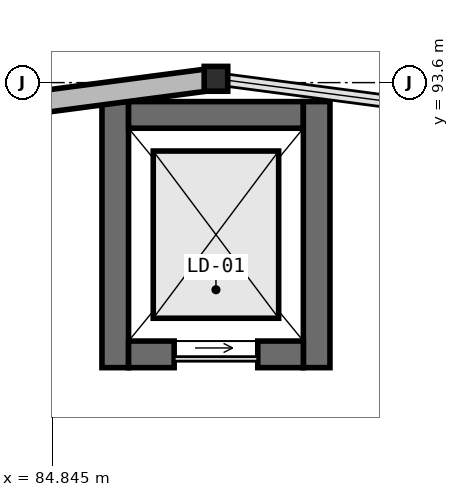
"""IFC4 building model, lengths in metres.
Left out: names, types, materials, properties, quantities, classifications, styles, units other than length and angle.
Written with IfcOpenShell. Run it as: python <this file> out.ifc"""

import sys

from ifc_helpers import new_model, si_unit, direction, frame, frame_2d, origin, origin_2d, place, context, subcontext, project, spatial, rectangle, i_section, extrude, element, fill, save


model = new_model("IFC4")
c1 = context("Model", 3, precision=1e-05, world=origin(), true_north=direction((0.0, 1.0)))
c2 = subcontext(c1, "Body", "Model", "MODEL_VIEW")
j1 = project(units=[si_unit("LENGTHUNIT", "METRE"), si_unit("PLANEANGLEUNIT", "RADIAN")], contexts=[c1])
p1 = place(None, origin())
s1 = spatial("IfcSite", under=j1, at=p1, CompositionType="ELEMENT")
p2 = place(p1, origin())
s2 = spatial("IfcBuilding", under=s1, at=p2, CompositionType="ELEMENT")
p3 = place(p2, frame((0.0, 0.0, 9.8)))
s3 = spatial("IfcBuildingStorey", under=s2, at=p3, CompositionType="ELEMENT", Elevation=9.8)
p4 = place(p3, frame((85.675, 89.85, 0.0), z_axis=(0.0, 0.0, 1.0), x_axis=(0.0, 1.0, 0.0)))
e1 = element("IfcWall", 1, at=p4, inside=s3, PredefinedType="SHEAR", context=c2, shape_type="SweptSolid", body=[
    extrude(rectangle(XDim=3.5, YDim=0.35, at=frame_2d((1.75, 0.0))), origin(), (0.0, 0.0, 1.0), 4.55),
])
p5 = place(p3, frame((85.85, 93.175, 0.0), z_axis=(0.0, 0.0, 1.0), x_axis=(1.0, 0.0, 0.0)))
e2 = element("IfcWall", 2, at=p5, inside=s3, PredefinedType="SHEAR", context=c2, shape_type="SweptSolid", body=[
    extrude(rectangle(XDim=2.3, YDim=0.35, at=frame_2d((1.15, 0.0))), origin(), (0.0, 0.0, 1.0), 4.55),
])
p6 = place(p3, frame((88.325, 93.35, 0.0), z_axis=(0.0, 0.0, 1.0), x_axis=(0.0, -1.0, 0.0)))
e3 = element("IfcWall", 3, at=p6, inside=s3, PredefinedType="SHEAR", context=c2, shape_type="SweptSolid", body=[
    extrude(rectangle(XDim=3.5, YDim=0.35, at=frame_2d((1.75, 0.0))), origin(), (0.0, 0.0, 1.0), 4.55),
])
p7 = place(p3, frame((88.15, 90.025, 0.0), z_axis=(0.0, 0.0, 1.0), x_axis=(-1.0, 0.0, 0.0)))
e4 = element("IfcWall", 4, at=p7, inside=s3, PredefinedType="SHEAR", context=c2, shape_type="SweptSolid", body=[
    extrude(rectangle(XDim=2.3, YDim=0.35, at=frame_2d((1.15, 0.0))), origin(), (0.0, 0.0, 1.0), 4.55),
])
p8 = place(p7, frame((0.6, 0.0, 0.0)))
e5 = element("IfcOpeningElement", 5, at=p8, cuts=e4, PredefinedType="OPENING", context=c2, shape_type="SweptSolid", body=[
    extrude(rectangle(XDim=1.1, YDim=2.15, at=frame_2d((0.55, 1.075))), frame((0.0, 0.185, 0.0), z_axis=(0.0, -1.0, 0.0), x_axis=(1.0, 0.0, 0.0)), (0.0, 0.0, 1.0), 0.37),
])
p9 = place(p3, frame((87.0, 93.65, 0.0), z_axis=(0.0, 0.0, 1.0), x_axis=(1.0, 0.0, 0.0)))
e6 = element("IfcColumn", 6, at=p9, inside=s3, PredefinedType="COLUMN", context=c2, shape_type="SweptSolid", body=[
    extrude(i_section(OverallWidth=0.31, OverallDepth=0.327, WebThickness=0.016, FlangeThickness=0.025, at=origin_2d()), origin(), (0.0, 0.0, 1.0), 4.55),
])
p10 = place(p3, frame((97.0, 93.344, 0.0), z_axis=(0.0, 0.0, 1.0), x_axis=(-0.991454872597, 0.130450126879, 0.0)))
e7 = element("IfcWall", 7, at=p10, inside=s3, PredefinedType="SOLIDWALL", context=c2, shape_type="SweptSolid", body=[
    extrude(rectangle(XDim=10.08, YDim=0.29, at=frame_2d((5.04, 0.0))), origin(), (0.0, 0.0, 1.0), 3.733),
])
p11 = place(p10, frame((4.13, 0.0, 0.95)))
e8 = element("IfcOpeningElement", 8, at=p11, cuts=e7, PredefinedType="OPENING", context=c2, shape_type="SweptSolid", body=[
    extrude(rectangle(XDim=1.82, YDim=1.51, at=frame_2d((0.91, 0.755))), frame((0.0, 0.155, 0.0), z_axis=(0.0, -1.0, 0.0), x_axis=(1.0, 0.0, 0.0)), (0.0, 0.0, 1.0), 0.31),
])
p12 = place(p3, frame((86.994, 94.659, 0.0), z_axis=(0.0, 0.0, 1.0), x_axis=(-0.991454872597, -0.130450126879, 0.0)))
e9 = element("IfcWall", 9, at=p12, inside=s3, PredefinedType="SOLIDWALL", context=c2, shape_type="SweptSolid", body=[
    extrude(rectangle(XDim=10.08, YDim=0.29, at=frame_2d((5.04, 0.0))), origin(), (0.0, 0.0, 1.0), 3.733),
])
p13 = place(p12, frame((3.965, 0.0, 0.95)))
e10 = element("IfcOpeningElement", 10, at=p13, cuts=e9, PredefinedType="OPENING", context=c2, shape_type="SweptSolid", body=[
    extrude(rectangle(XDim=2.15, YDim=1.43, at=frame_2d((1.075, 0.715))), frame((0.0, 0.155, 0.0), z_axis=(0.0, -1.0, 0.0), x_axis=(1.0, 0.0, 0.0)), (0.0, 0.0, 1.0), 0.31),
])
p14 = place(p3, frame((77.259, 92.368, 0.0), z_axis=(0.0, 0.0, 1.0), x_axis=(0.991456749128, 0.130435863969, 0.0)))
e11 = element("IfcWall", 11, at=p14, inside=s3, PredefinedType="SOLIDWALL", context=c2, shape_type="SweptSolid", body=[
    extrude(rectangle(XDim=9.821, YDim=0.29, at=frame_2d((4.911, 0.0))), origin(), (0.0, 0.0, 1.0), 3.814),
])
p15 = place(p14, frame((1.93, 0.0, 0.95)))
e12 = element("IfcOpeningElement", 12, at=p15, cuts=e11, PredefinedType="OPENING", context=c2, shape_type="SweptSolid", body=[
    extrude(rectangle(XDim=1.05, YDim=1.8, at=frame_2d((0.525, 0.9))), frame((0.0, 0.155, 0.0), z_axis=(0.0, -1.0, 0.0), x_axis=(1.0, 0.0, 0.0)), (0.0, 0.0, 1.0), 0.31),
])
p16 = place(p8, origin())
e13 = element("IfcDoor", 13, at=p16, inside=s3, OperationType="SLIDING_TO_LEFT", PredefinedType="USERDEFINED", context=c2, shape_type="SweptSolid", body=[
    extrude(rectangle(XDim=1.1, YDim=2.15, at=frame_2d((0.55, 1.075))), frame((0.0, 0.025, 0.0), z_axis=(0.0, -1.0, 0.0), x_axis=(1.0, 0.0, 0.0)), (0.0, 0.0, 1.0), 0.05),
])
fill(e5, e13)
save(model, sys.argv[1])
